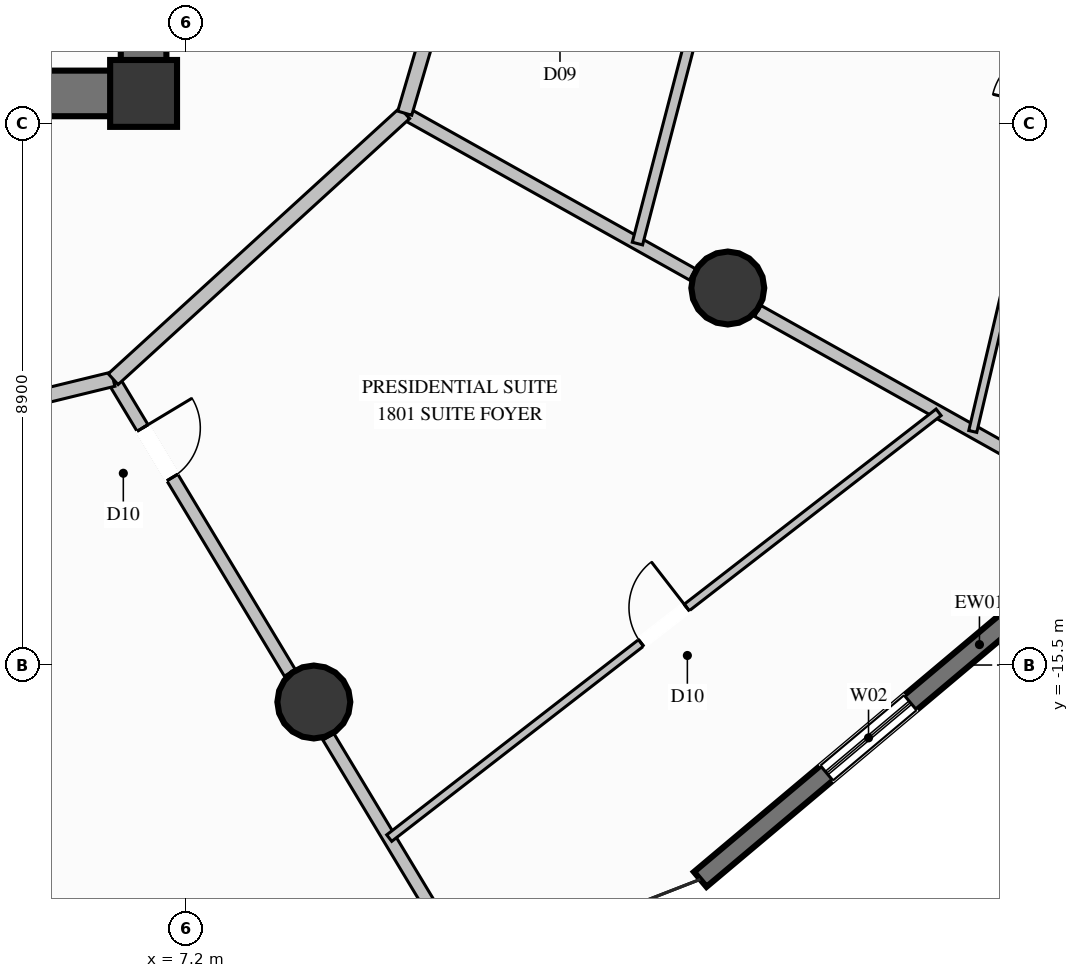
"""IFC4 building model, lengths in metres.
Left out: names, types, materials, properties, quantities, classifications, styles, units other than length and angle.
Written with IfcOpenShell. Run it as: python <this file> out.ifc"""

import sys

from ifc_helpers import new_model, si_unit, direction, frame, frame_2d, origin, origin_2d, place, context, subcontext, project, spatial, rectangle, circle, extrude, element, fill, save


model = new_model("IFC4")
c1 = context("Model", 3, precision=1e-05, world=origin(), true_north=direction((0.0, 1.0)))
c2 = subcontext(c1, "Body", "Model", "MODEL_VIEW")
j1 = project(units=[si_unit("LENGTHUNIT", "METRE"), si_unit("PLANEANGLEUNIT", "RADIAN")], contexts=[c1])
p1 = place(None, origin())
s1 = spatial("IfcSite", under=j1, at=p1, CompositionType="ELEMENT")
p2 = place(p1, origin())
s2 = spatial("IfcBuilding", under=s1, at=p2, CompositionType="ELEMENT")
p3 = place(p2, frame((0.0, 0.0, 68.0)))
s3 = spatial("IfcBuildingStorey", under=s2, at=p3, CompositionType="ELEMENT", Elevation=68.0)
p4 = place(p3, frame((6.5, -6.1, 0.0), z_axis=(0.0, 0.0, 1.0), x_axis=(1.0, 0.0, 0.0)))
e1 = element("IfcColumn", 1, at=p4, inside=s3, PredefinedType="COLUMN", context=c2, shape_type="SweptSolid", body=[
    extrude(rectangle(XDim=1.1, YDim=1.1, at=origin_2d()), origin(), (0.0, 0.0, 1.0), 3.6),
])
p5 = place(p3, frame((4.15, -6.1, 0.0), z_axis=(0.0, 0.0, 1.0), x_axis=(1.0, 0.0, 0.0)))
e2 = element("IfcWall", 2, at=p5, inside=s3, PredefinedType="SHEAR", context=c2, shape_type="SweptSolid", body=[
    extrude(rectangle(XDim=1.975, YDim=0.75, at=frame_2d((0.988, 0.0))), origin(), (0.0, 0.0, 1.0), 3.6),
])
p6 = place(p3, frame((6.5, -6.475, 0.0), z_axis=(0.0, 0.0, 1.0), x_axis=(0.0, 1.0, 0.0)))
e3 = element("IfcWall", 3, at=p6, inside=s3, PredefinedType="SHEAR", context=c2, shape_type="SweptSolid", body=[
    extrude(rectangle(XDim=4.125, YDim=0.75, at=frame_2d((2.062, 0.0))), origin(), (0.0, 0.0, 1.0), 3.6),
])
for number, where, z_axis, x_axis in (
    (4, (9.3, -16.108, 0.0), (0.0, 0.0, 1.0), (1.0, 0.0, 0.0)),
    (5, (16.108, -9.3, 0.0), (0.0, 0.0, 1.0), (1.0, 0.0, 0.0)),
):
    element("IfcColumn", number, at=place(p3, frame(where, z_axis=z_axis, x_axis=x_axis)), inside=s3, PredefinedType="COLUMN", context=c2, shape_type="SweptSolid", body=[
        extrude(circle(Radius=0.6, at=origin_2d()), origin(), (0.0, 0.0, 1.0), 3.6),
    ])
p7 = place(p3, frame((21.191, -14.37, 0.0), z_axis=(0.0, 0.0, 1.0), x_axis=(-0.765388915414, -0.643568029164, 0.0)))
e6 = element("IfcWall", 6, at=p7, inside=s3, PredefinedType="SOLIDWALL", context=c2, shape_type="SweptSolid", body=[
    extrude(rectangle(XDim=7.233, YDim=0.32, at=frame_2d((3.616, 0.0))), origin(), (0.0, 0.0, 1.0), 3.34),
])
p8 = place(p7, frame((2.717, 0.0, 0.35)))
e7 = element("IfcOpeningElement", 7, at=p8, cuts=e6, PredefinedType="OPENING", context=c2, shape_type="SweptSolid", body=[
    extrude(rectangle(XDim=1.8, YDim=2.6, at=frame_2d((0.9, 1.3))), frame((0.0, 0.17, 0.0), z_axis=(0.0, -1.0, 0.0), x_axis=(1.0, 0.0, 0.0)), (0.0, 0.0, 1.0), 0.34),
])
p9 = place(p3, frame((6.0, -10.799, 0.0), z_axis=(0.0, 0.0, 1.0), x_axis=(0.515552707099, -0.856857868146, 0.0)))
e8 = element("IfcWall", 8, at=p9, inside=s3, PredefinedType="PARTITIONING", context=c2, shape_type="SweptSolid", body=[
    extrude(rectangle(XDim=5.637, YDim=0.21, at=frame_2d((2.818, 0.0))), origin(), (0.0, 0.0, 1.0), 2.709),
])
p10 = place(p9, frame((0.937, 0.0, 0.0)))
e9 = element("IfcOpeningElement", 9, at=p10, cuts=e8, PredefinedType="OPENING", context=c2, shape_type="SweptSolid", body=[
    extrude(rectangle(XDim=0.95, YDim=2.1, at=frame_2d((0.475, 1.05))), frame((0.0, 0.115, 0.0), z_axis=(0.0, -1.0, 0.0), x_axis=(1.0, 0.0, 0.0)), (0.0, 0.0, 1.0), 0.23),
])
p11 = place(p3, frame((9.539, -16.68, 0.0), z_axis=(0.0, 0.0, 1.0), x_axis=(0.515403672872, -0.856947521141, 0.0)))
e10 = element("IfcWall", 10, at=p11, inside=s3, PredefinedType="PARTITIONING", context=c2, shape_type="SweptSolid", body=[
    extrude(rectangle(XDim=4.427, YDim=0.21, at=frame_2d((2.214, 0.0))), origin(), (0.0, 0.0, 1.0), 3.34),
])
p12 = place(p3, frame((10.795, -6.425, 0.0), z_axis=(0.0, 0.0, 1.0), x_axis=(0.872447700458, -0.488707489164, 0.0)))
e11 = element("IfcWall", 11, at=p12, inside=s3, PredefinedType="PARTITIONING", context=c2, shape_type="SweptSolid", body=[
    extrude(rectangle(XDim=5.426, YDim=0.21, at=frame_2d((2.713, 0.0))), origin(), (0.0, 0.0, 1.0), 2.709),
])
p13 = place(p3, frame((16.6, -9.677, 0.0), z_axis=(0.0, 0.0, 1.0), x_axis=(0.872408051336, -0.48877826462, 0.0)))
e12 = element("IfcWall", 12, at=p13, inside=s3, PredefinedType="PARTITIONING", context=c2, shape_type="SweptSolid", body=[
    extrude(rectangle(XDim=6.248, YDim=0.21, at=frame_2d((3.124, 0.0))), origin(), (0.0, 0.0, 1.0), 3.34),
])
p14 = place(p3, frame((-0.55, -12.4, 0.0), z_axis=(0.0, 0.0, 1.0), x_axis=(0.971409027631, 0.237412091177, 0.0)))
e13 = element("IfcWall", 13, at=p14, inside=s3, PredefinedType="PARTITIONING", context=c2, shape_type="SweptSolid", body=[
    extrude(rectangle(XDim=6.743, YDim=0.24, at=frame_2d((3.372, 0.0))), origin(), (0.0, 0.0, 1.0), 3.34),
])
p15 = place(p3, frame((6.0, -10.799, 0.0), z_axis=(0.0, 0.0, 1.0), x_axis=(0.73878836807, 0.673937495028, 0.0)))
e14 = element("IfcWall", 14, at=p15, inside=s3, PredefinedType="PARTITIONING", context=c2, shape_type="SweptSolid", body=[
    extrude(rectangle(XDim=6.49, YDim=0.24, at=frame_2d((3.245, 0.0))), origin(), (0.0, 0.0, 1.0), 3.34),
])
p16 = place(p3, frame((10.54, -18.346, 0.0), z_axis=(0.0, 0.0, 1.0), x_axis=(0.790419447316, 0.612565994245, 0.0)))
e15 = element("IfcWall", 15, at=p16, inside=s3, PredefinedType="PARTITIONING", context=c2, shape_type="SweptSolid", body=[
    extrude(rectangle(XDim=11.43, YDim=0.135, at=frame_2d((5.715, 0.0))), origin(), (0.0, 0.0, 1.0), 3.34),
])
p17 = place(p16, frame((5.24, 0.0, 0.0)))
e16 = element("IfcOpeningElement", 16, at=p17, cuts=e15, PredefinedType="OPENING", context=c2, shape_type="SweptSolid", body=[
    extrude(rectangle(XDim=0.95, YDim=2.1, at=frame_2d((0.475, 1.05))), frame((0.0, 0.078, 0.0), z_axis=(0.0, -1.0, 0.0), x_axis=(1.0, 0.0, 0.0)), (0.0, 0.0, 1.0), 0.155),
])
p18 = place(p3, frame((10.795, -6.425, 0.0), z_axis=(0.0, 0.0, 1.0), x_axis=(0.281852929568, 0.959457620791, 0.0)))
e17 = element("IfcWall", 17, at=p18, inside=s3, PredefinedType="PARTITIONING", context=c2, shape_type="SweptSolid", body=[
    extrude(rectangle(XDim=2.615, YDim=0.24, at=frame_2d((1.308, 0.0))), origin(), (0.0, 0.0, 1.0), 3.34),
])
p19 = place(p3, frame((14.622, -8.569, 0.0), z_axis=(0.0, 0.0, 1.0), x_axis=(0.251773997666, 0.967786058021, 0.0)))
e18 = element("IfcWall", 18, at=p19, inside=s3, PredefinedType="PLUMBINGWALL", context=c2, shape_type="SweptSolid", body=[
    extrude(rectangle(XDim=3.59, YDim=0.175, at=frame_2d((1.795, 0.0))), origin(), (0.0, 0.0, 1.0), 3.34),
])
p20 = place(p3, frame((20.137, -11.659, 0.0), z_axis=(0.0, 0.0, 1.0), x_axis=(0.229110239879, 0.973400481807, 0.0)))
e19 = element("IfcWall", 19, at=p20, inside=s3, PredefinedType="PARTITIONING", context=c2, shape_type="SweptSolid", body=[
    extrude(rectangle(XDim=11.898, YDim=0.135, at=frame_2d((5.949, 0.0))), origin(), (0.0, 0.0, 1.0), 3.34),
])
p21 = place(p20, frame((5.474, 0.0, 0.0)))
e20 = element("IfcOpeningElement", 20, at=p21, cuts=e19, PredefinedType="OPENING", context=c2, shape_type="SweptSolid", body=[
    extrude(rectangle(XDim=0.95, YDim=2.1, at=frame_2d((0.475, 1.05))), frame((0.0, 0.078, 0.0), z_axis=(0.0, -1.0, 0.0), x_axis=(1.0, 0.0, 0.0)), (0.0, 0.0, 1.0), 0.155),
])
p22 = place(p8, origin())
e21 = element("IfcWindow", 21, at=p22, inside=s3, PartitioningType="SINGLE_PANEL", PredefinedType="WINDOW", context=c2, shape_type="SweptSolid", body=[
    extrude(rectangle(XDim=1.8, YDim=2.6, at=frame_2d((0.9, 1.3))), frame((0.0, 0.03, 0.0), z_axis=(0.0, -1.0, 0.0), x_axis=(1.0, 0.0, 0.0)), (0.0, 0.0, 1.0), 0.06),
])
fill(e7, e21)
p23 = place(p10, origin())
e22 = element("IfcDoor", 22, at=p23, inside=s3, OperationType="SINGLE_SWING_LEFT", PredefinedType="DOOR", context=c2, shape_type="SweptSolid", body=[
    extrude(rectangle(XDim=0.95, YDim=2.1, at=frame_2d((0.475, 1.05))), frame((0.0, 0.025, 0.0), z_axis=(0.0, -1.0, 0.0), x_axis=(1.0, 0.0, 0.0)), (0.0, 0.0, 1.0), 0.05),
])
fill(e9, e22)
p24 = place(p17, origin())
e23 = element("IfcDoor", 23, at=p24, inside=s3, OperationType="SINGLE_SWING_RIGHT", PredefinedType="DOOR", context=c2, shape_type="SweptSolid", body=[
    extrude(rectangle(XDim=0.95, YDim=2.1, at=frame_2d((0.475, 1.05))), frame((0.0, 0.025, 0.0), z_axis=(0.0, -1.0, 0.0), x_axis=(1.0, 0.0, 0.0)), (0.0, 0.0, 1.0), 0.05),
])
fill(e16, e23)
save(model, sys.argv[1])
